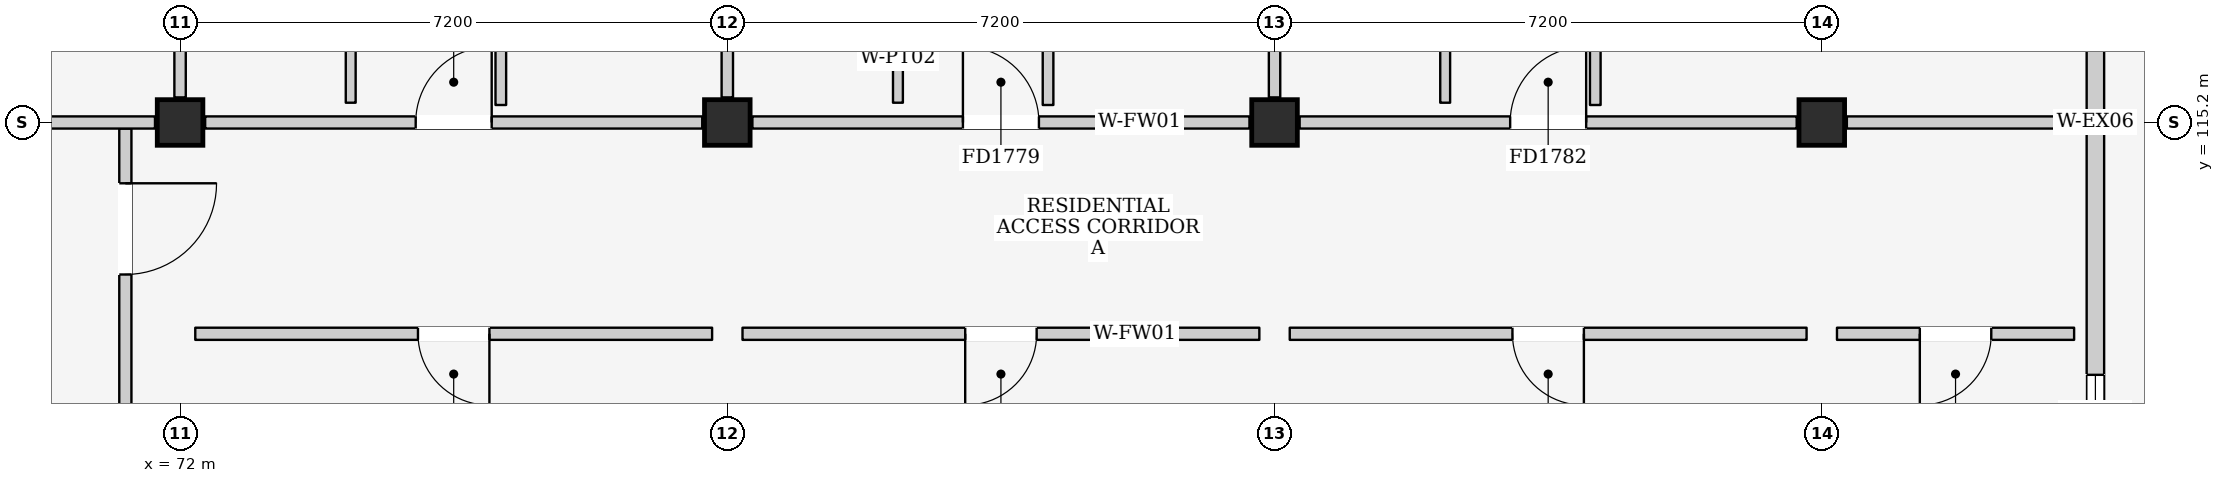
"""IFC4 building model, lengths in metres.
Left out: names, types, materials, properties, quantities, classifications, styles, units other than length and angle.
Written with IfcOpenShell. Run it as: python <this file> out.ifc"""

import sys

from ifc_helpers import new_model, si_unit, direction, frame, frame_2d, origin, origin_2d, place, context, subcontext, project, spatial, rectangle, extrude, element, fill, save


model = new_model("IFC4")
c1 = context("Model", 3, precision=1e-05, world=origin(), true_north=direction((0.0, 1.0)))
c2 = subcontext(c1, "Body", "Model", "MODEL_VIEW")
j1 = project(units=[si_unit("LENGTHUNIT", "METRE"), si_unit("PLANEANGLEUNIT", "RADIAN")], contexts=[c1])
p1 = place(None, origin())
s1 = spatial("IfcSite", under=j1, at=p1, CompositionType="ELEMENT")
p2 = place(p1, origin())
s2 = spatial("IfcBuilding", under=s1, at=p2, CompositionType="ELEMENT")
p3 = place(p2, frame((0.0, 0.0, 31.5)))
s3 = spatial("IfcBuildingStorey", under=s2, at=p3, CompositionType="ELEMENT", Elevation=31.5)
for number, where, z_axis, x_axis in (
    (1, (72.0, 115.2, 0.0), (0.0, 0.0, 1.0), (1.0, 0.0, 0.0)),
    (2, (79.2, 115.2, 0.0), (0.0, 0.0, 1.0), (1.0, 0.0, 0.0)),
    (3, (86.4, 115.2, 0.0), (0.0, 0.0, 1.0), (1.0, 0.0, 0.0)),
    (4, (93.6, 115.2, 0.0), (0.0, 0.0, 1.0), (1.0, 0.0, 0.0)),
):
    element("IfcColumn", number, at=place(p3, frame(where, z_axis=z_axis, x_axis=x_axis)), inside=s3, PredefinedType="COLUMN", context=c2, shape_type="SweptSolid", body=[
        extrude(rectangle(XDim=0.6, YDim=0.6, at=origin_2d()), origin(), (0.0, 0.0, 1.0), 3.3),
    ])
p4 = place(p3, frame((97.2, 108.13, 0.0), z_axis=(0.0, 0.0, 1.0), x_axis=(0.0, 1.0, 0.0)))
e5 = element("IfcWall", 5, at=p4, inside=s3, PredefinedType="ELEMENTEDWALL", context=c2, shape_type="SweptSolid", body=[
    extrude(rectangle(XDim=7.07, YDim=0.23, at=frame_2d((3.535, 0.0))), origin(), (0.0, 0.0, 1.0), 2.515),
])
p5 = place(p4, frame((2.75, 0.0, 1.1)))
e6 = element("IfcOpeningElement", 6, at=p5, cuts=e5, PredefinedType="OPENING", context=c2, shape_type="SweptSolid", body=[
    extrude(rectangle(XDim=1.0, YDim=0.9, at=frame_2d((0.5, 0.45))), frame((0.0, 0.13, 0.0), z_axis=(0.0, -1.0, 0.0), x_axis=(1.0, 0.0, 0.0)), (0.0, 0.0, 1.0), 0.26),
])
p6 = place(p3, frame((97.2, 115.2, 0.0), z_axis=(0.0, 0.0, 1.0), x_axis=(0.0, 1.0, 0.0)))
e7 = element("IfcWall", 7, at=p6, inside=s3, PredefinedType="ELEMENTEDWALL", context=c2, shape_type="SweptSolid", body=[
    extrude(rectangle(XDim=7.07, YDim=0.23, at=frame_2d((3.535, 0.0))), origin(), (0.0, 0.0, 1.0), 2.515),
])
p7 = place(p6, frame((3.6, 0.0, 0.0)))
e8 = element("IfcOpeningElement", 8, at=p7, cuts=e7, PredefinedType="OPENING", context=c2, shape_type="SweptSolid", body=[
    extrude(rectangle(XDim=1.08, YDim=2.12, at=frame_2d((0.54, 1.06))), frame((0.0, 0.13, 0.0), z_axis=(0.0, -1.0, 0.0), x_axis=(1.0, 0.0, 0.0)), (0.0, 0.0, 1.0), 0.26),
])
p8 = place(p3, frame((71.28, 110.8, 0.0), z_axis=(0.0, 0.0, 1.0), x_axis=(0.0, 1.0, 0.0)))
e9 = element("IfcWall", 9, at=p8, inside=s3, PredefinedType="PARTITIONING", context=c2, shape_type="SweptSolid", body=[
    extrude(rectangle(XDim=4.32, YDim=0.16, at=frame_2d((2.16, 0.0))), origin(), (0.0, 0.0, 1.0), 3.08),
])
p9 = place(p8, frame((2.4, 0.0, 0.0)))
e10 = element("IfcOpeningElement", 10, at=p9, cuts=e9, PredefinedType="OPENING", context=c2, shape_type="SweptSolid", body=[
    extrude(rectangle(XDim=1.2, YDim=2.2, at=frame_2d((0.6, 1.1))), frame((0.0, 0.095, 0.0), z_axis=(0.0, -1.0, 0.0), x_axis=(1.0, 0.0, 0.0)), (0.0, 0.0, 1.0), 0.19),
])
p10 = place(p3, frame((65.13, 115.2, 0.0), z_axis=(0.0, 0.0, 1.0), x_axis=(1.0, 0.0, 0.0)))
e11 = element("IfcWall", 11, at=p10, inside=s3, PredefinedType="PARTITIONING", context=c2, shape_type="SweptSolid", body=[
    extrude(rectangle(XDim=6.54, YDim=0.16, at=frame_2d((3.27, 0.0))), origin(), (0.0, 0.0, 1.0), 2.415),
])
p11 = place(p10, frame((2.77, 0.0, 0.0)))
e12 = element("IfcOpeningElement", 12, at=p11, cuts=e11, PredefinedType="OPENING", context=c2, shape_type="SweptSolid", body=[
    extrude(rectangle(XDim=1.0, YDim=2.15, at=frame_2d((0.5, 1.075))), frame((0.0, 0.095, 0.0), z_axis=(0.0, -1.0, 0.0), x_axis=(1.0, 0.0, 0.0)), (0.0, 0.0, 1.0), 0.19),
])
p12 = place(p3, frame((72.0, 115.53, 0.0), z_axis=(0.0, 0.0, 1.0), x_axis=(0.0, 1.0, 0.0)))
e13 = element("IfcWall", 13, at=p12, inside=s3, PredefinedType="PARTITIONING", context=c2, shape_type="SweptSolid", body=[
    extrude(rectangle(XDim=6.54, YDim=0.15, at=frame_2d((3.27, 0.0))), origin(), (0.0, 0.0, 1.0), 2.565),
])
p13 = place(p3, frame((72.33, 115.2, 0.0), z_axis=(0.0, 0.0, 1.0), x_axis=(1.0, 0.0, 0.0)))
e14 = element("IfcWall", 14, at=p13, inside=s3, PredefinedType="PARTITIONING", context=c2, shape_type="SweptSolid", body=[
    extrude(rectangle(XDim=6.54, YDim=0.16, at=frame_2d((3.27, 0.0))), origin(), (0.0, 0.0, 1.0), 2.415),
])
p14 = place(p13, frame((2.77, 0.0, 0.0)))
e15 = element("IfcOpeningElement", 15, at=p14, cuts=e14, PredefinedType="OPENING", context=c2, shape_type="SweptSolid", body=[
    extrude(rectangle(XDim=1.0, YDim=2.15, at=frame_2d((0.5, 1.075))), frame((0.0, 0.095, 0.0), z_axis=(0.0, -1.0, 0.0), x_axis=(1.0, 0.0, 0.0)), (0.0, 0.0, 1.0), 0.19),
])
p15 = place(p3, frame((79.2, 115.53, 0.0), z_axis=(0.0, 0.0, 1.0), x_axis=(0.0, 1.0, 0.0)))
e16 = element("IfcWall", 16, at=p15, inside=s3, PredefinedType="PARTITIONING", context=c2, shape_type="SweptSolid", body=[
    extrude(rectangle(XDim=6.54, YDim=0.15, at=frame_2d((3.27, 0.0))), origin(), (0.0, 0.0, 1.0), 2.565),
])
p16 = place(p3, frame((74.245, 115.46, 0.0), z_axis=(0.0, 0.0, 1.0), x_axis=(0.0, 1.0, 0.0)))
e17 = element("IfcWall", 17, at=p16, inside=s3, PredefinedType="PARTITIONING", context=c2, shape_type="SweptSolid", body=[
    extrude(rectangle(XDim=2.13, YDim=0.13, at=frame_2d((1.065, 0.0))), origin(), (0.0, 0.0, 1.0), 3.08),
])
p17 = place(p3, frame((76.22, 115.43, 0.0), z_axis=(0.0, 0.0, 1.0), x_axis=(0.0, 1.0, 0.0)))
e18 = element("IfcWall", 18, at=p17, inside=s3, PredefinedType="PARTITIONING", context=c2, shape_type="SweptSolid", body=[
    extrude(rectangle(XDim=2.15, YDim=0.14, at=frame_2d((1.075, 0.0))), origin(), (0.0, 0.0, 1.0), 3.08),
])
p18 = place(p3, frame((79.53, 115.2, 0.0), z_axis=(0.0, 0.0, 1.0), x_axis=(1.0, 0.0, 0.0)))
e19 = element("IfcWall", 19, at=p18, inside=s3, PredefinedType="PARTITIONING", context=c2, shape_type="SweptSolid", body=[
    extrude(rectangle(XDim=6.54, YDim=0.16, at=frame_2d((3.27, 0.0))), origin(), (0.0, 0.0, 1.0), 2.415),
])
p19 = place(p18, frame((2.77, 0.0, 0.0)))
e20 = element("IfcOpeningElement", 20, at=p19, cuts=e19, PredefinedType="OPENING", context=c2, shape_type="SweptSolid", body=[
    extrude(rectangle(XDim=1.0, YDim=2.15, at=frame_2d((0.5, 1.075))), frame((0.0, 0.095, 0.0), z_axis=(0.0, -1.0, 0.0), x_axis=(1.0, 0.0, 0.0)), (0.0, 0.0, 1.0), 0.19),
])
p20 = place(p3, frame((86.4, 115.53, 0.0), z_axis=(0.0, 0.0, 1.0), x_axis=(0.0, 1.0, 0.0)))
e21 = element("IfcWall", 21, at=p20, inside=s3, PredefinedType="PARTITIONING", context=c2, shape_type="SweptSolid", body=[
    extrude(rectangle(XDim=6.54, YDim=0.15, at=frame_2d((3.27, 0.0))), origin(), (0.0, 0.0, 1.0), 2.565),
])
p21 = place(p3, frame((81.445, 115.46, 0.0), z_axis=(0.0, 0.0, 1.0), x_axis=(0.0, 1.0, 0.0)))
e22 = element("IfcWall", 22, at=p21, inside=s3, PredefinedType="PARTITIONING", context=c2, shape_type="SweptSolid", body=[
    extrude(rectangle(XDim=2.13, YDim=0.13, at=frame_2d((1.065, 0.0))), origin(), (0.0, 0.0, 1.0), 3.08),
])
p22 = place(p3, frame((83.42, 115.43, 0.0), z_axis=(0.0, 0.0, 1.0), x_axis=(0.0, 1.0, 0.0)))
e23 = element("IfcWall", 23, at=p22, inside=s3, PredefinedType="PARTITIONING", context=c2, shape_type="SweptSolid", body=[
    extrude(rectangle(XDim=2.15, YDim=0.14, at=frame_2d((1.075, 0.0))), origin(), (0.0, 0.0, 1.0), 3.08),
])
p23 = place(p3, frame((86.73, 115.2, 0.0), z_axis=(0.0, 0.0, 1.0), x_axis=(1.0, 0.0, 0.0)))
e24 = element("IfcWall", 24, at=p23, inside=s3, PredefinedType="PARTITIONING", context=c2, shape_type="SweptSolid", body=[
    extrude(rectangle(XDim=6.54, YDim=0.16, at=frame_2d((3.27, 0.0))), origin(), (0.0, 0.0, 1.0), 2.415),
])
p24 = place(p23, frame((2.77, 0.0, 0.0)))
e25 = element("IfcOpeningElement", 25, at=p24, cuts=e24, PredefinedType="OPENING", context=c2, shape_type="SweptSolid", body=[
    extrude(rectangle(XDim=1.0, YDim=2.15, at=frame_2d((0.5, 1.075))), frame((0.0, 0.095, 0.0), z_axis=(0.0, -1.0, 0.0), x_axis=(1.0, 0.0, 0.0)), (0.0, 0.0, 1.0), 0.19),
])
p25 = place(p3, frame((93.93, 115.2, 0.0), z_axis=(0.0, 0.0, 1.0), x_axis=(1.0, 0.0, 0.0)))
e26 = element("IfcWall", 26, at=p25, inside=s3, PredefinedType="PARTITIONING", context=c2, shape_type="SweptSolid", body=[
    extrude(rectangle(XDim=2.99, YDim=0.16, at=frame_2d((1.495, 0.0))), origin(), (0.0, 0.0, 1.0), 2.415),
])
p26 = place(p3, frame((88.645, 115.46, 0.0), z_axis=(0.0, 0.0, 1.0), x_axis=(0.0, 1.0, 0.0)))
e27 = element("IfcWall", 27, at=p26, inside=s3, PredefinedType="PARTITIONING", context=c2, shape_type="SweptSolid", body=[
    extrude(rectangle(XDim=2.13, YDim=0.13, at=frame_2d((1.065, 0.0))), origin(), (0.0, 0.0, 1.0), 3.08),
])
p27 = place(p3, frame((90.62, 115.43, 0.0), z_axis=(0.0, 0.0, 1.0), x_axis=(0.0, 1.0, 0.0)))
e28 = element("IfcWall", 28, at=p27, inside=s3, PredefinedType="PARTITIONING", context=c2, shape_type="SweptSolid", body=[
    extrude(rectangle(XDim=2.15, YDim=0.14, at=frame_2d((1.075, 0.0))), origin(), (0.0, 0.0, 1.0), 3.08),
])
p28 = place(p3, frame((72.2, 112.42, 0.0), z_axis=(0.0, 0.0, 1.0), x_axis=(1.0, 0.0, 0.0)))
e29 = element("IfcWall", 29, at=p28, inside=s3, PredefinedType="PARTITIONING", context=c2, shape_type="SweptSolid", body=[
    extrude(rectangle(XDim=6.8, YDim=0.16, at=frame_2d((3.4, 0.0))), origin(), (0.0, 0.0, 1.0), 3.08),
])
p29 = place(p28, frame((2.93, 0.0, 0.0)))
e30 = element("IfcOpeningElement", 30, at=p29, cuts=e29, PredefinedType="OPENING", context=c2, shape_type="SweptSolid", body=[
    extrude(rectangle(XDim=0.94, YDim=2.12, at=frame_2d((0.47, 1.06))), frame((0.0, 0.095, 0.0), z_axis=(0.0, -1.0, 0.0), x_axis=(1.0, 0.0, 0.0)), (0.0, 0.0, 1.0), 0.19),
])
p30 = place(p3, frame((79.4, 112.42, 0.0), z_axis=(0.0, 0.0, 1.0), x_axis=(1.0, 0.0, 0.0)))
e31 = element("IfcWall", 31, at=p30, inside=s3, PredefinedType="PARTITIONING", context=c2, shape_type="SweptSolid", body=[
    extrude(rectangle(XDim=6.8, YDim=0.16, at=frame_2d((3.4, 0.0))), origin(), (0.0, 0.0, 1.0), 3.08),
])
p31 = place(p30, frame((2.93, 0.0, 0.0)))
e32 = element("IfcOpeningElement", 32, at=p31, cuts=e31, PredefinedType="OPENING", context=c2, shape_type="SweptSolid", body=[
    extrude(rectangle(XDim=0.94, YDim=2.12, at=frame_2d((0.47, 1.06))), frame((0.0, 0.095, 0.0), z_axis=(0.0, -1.0, 0.0), x_axis=(1.0, 0.0, 0.0)), (0.0, 0.0, 1.0), 0.19),
])
p32 = place(p3, frame((86.6, 112.42, 0.0), z_axis=(0.0, 0.0, 1.0), x_axis=(1.0, 0.0, 0.0)))
e33 = element("IfcWall", 33, at=p32, inside=s3, PredefinedType="PARTITIONING", context=c2, shape_type="SweptSolid", body=[
    extrude(rectangle(XDim=6.8, YDim=0.16, at=frame_2d((3.4, 0.0))), origin(), (0.0, 0.0, 1.0), 3.08),
])
p33 = place(p32, frame((2.93, 0.0, 0.0)))
e34 = element("IfcOpeningElement", 34, at=p33, cuts=e33, PredefinedType="OPENING", context=c2, shape_type="SweptSolid", body=[
    extrude(rectangle(XDim=0.94, YDim=2.12, at=frame_2d((0.47, 1.06))), frame((0.0, 0.095, 0.0), z_axis=(0.0, -1.0, 0.0), x_axis=(1.0, 0.0, 0.0)), (0.0, 0.0, 1.0), 0.19),
])
p34 = place(p3, frame((93.8, 112.42, 0.0), z_axis=(0.0, 0.0, 1.0), x_axis=(1.0, 0.0, 0.0)))
e35 = element("IfcWall", 35, at=p34, inside=s3, PredefinedType="PARTITIONING", context=c2, shape_type="SweptSolid", body=[
    extrude(rectangle(XDim=3.12, YDim=0.16, at=frame_2d((1.56, 0.0))), origin(), (0.0, 0.0, 1.0), 3.08),
])
p35 = place(p34, frame((1.09, 0.0, 0.0)))
e36 = element("IfcOpeningElement", 36, at=p35, cuts=e35, PredefinedType="OPENING", context=c2, shape_type="SweptSolid", body=[
    extrude(rectangle(XDim=0.94, YDim=2.12, at=frame_2d((0.47, 1.06))), frame((0.0, 0.095, 0.0), z_axis=(0.0, -1.0, 0.0), x_axis=(1.0, 0.0, 0.0)), (0.0, 0.0, 1.0), 0.19),
])
p36 = place(p5, origin())
e37 = element("IfcWindow", 37, at=p36, inside=s3, PartitioningType="SINGLE_PANEL", PredefinedType="WINDOW", context=c2, shape_type="SweptSolid", body=[
    extrude(rectangle(XDim=1.0, YDim=0.9, at=frame_2d((0.5, 0.45))), frame((0.0, 0.03, 0.0), z_axis=(0.0, -1.0, 0.0), x_axis=(1.0, 0.0, 0.0)), (0.0, 0.0, 1.0), 0.06),
])
fill(e6, e37)
p37 = place(p9, frame((1.2, 0.0, 0.0), z_axis=(0.0, 0.0, 1.0), x_axis=(-1.0, 0.0, 0.0)))
e38 = element("IfcDoor", 38, at=p37, inside=s3, OperationType="SINGLE_SWING_LEFT", PredefinedType="DOOR", context=c2, shape_type="SweptSolid", body=[
    extrude(rectangle(XDim=1.2, YDim=2.2, at=frame_2d((0.6, 1.1))), frame((0.0, 0.025, 0.0), z_axis=(0.0, -1.0, 0.0), x_axis=(1.0, 0.0, 0.0)), (0.0, 0.0, 1.0), 0.05),
])
fill(e10, e38)
p38 = place(p14, origin())
e39 = element("IfcDoor", 39, at=p38, inside=s3, OperationType="SINGLE_SWING_RIGHT", PredefinedType="DOOR", context=c2, shape_type="SweptSolid", body=[
    extrude(rectangle(XDim=1.0, YDim=2.15, at=frame_2d((0.5, 1.075))), frame((0.0, 0.025, 0.0), z_axis=(0.0, -1.0, 0.0), x_axis=(1.0, 0.0, 0.0)), (0.0, 0.0, 1.0), 0.05),
])
fill(e15, e39)
p39 = place(p19, origin())
e40 = element("IfcDoor", 40, at=p39, inside=s3, OperationType="SINGLE_SWING_LEFT", PredefinedType="DOOR", context=c2, shape_type="SweptSolid", body=[
    extrude(rectangle(XDim=1.0, YDim=2.15, at=frame_2d((0.5, 1.075))), frame((0.0, 0.025, 0.0), z_axis=(0.0, -1.0, 0.0), x_axis=(1.0, 0.0, 0.0)), (0.0, 0.0, 1.0), 0.05),
])
fill(e20, e40)
p40 = place(p24, origin())
e41 = element("IfcDoor", 41, at=p40, inside=s3, OperationType="SINGLE_SWING_RIGHT", PredefinedType="DOOR", context=c2, shape_type="SweptSolid", body=[
    extrude(rectangle(XDim=1.0, YDim=2.15, at=frame_2d((0.5, 1.075))), frame((0.0, 0.025, 0.0), z_axis=(0.0, -1.0, 0.0), x_axis=(1.0, 0.0, 0.0)), (0.0, 0.0, 1.0), 0.05),
])
fill(e25, e41)
p41 = place(p29, frame((0.94, 0.0, 0.0), z_axis=(0.0, 0.0, 1.0), x_axis=(-1.0, 0.0, 0.0)))
e42 = element("IfcDoor", 42, at=p41, inside=s3, OperationType="SINGLE_SWING_LEFT", PredefinedType="DOOR", context=c2, shape_type="SweptSolid", body=[
    extrude(rectangle(XDim=0.94, YDim=2.12, at=frame_2d((0.47, 1.06))), frame((0.0, 0.025, 0.0), z_axis=(0.0, -1.0, 0.0), x_axis=(1.0, 0.0, 0.0)), (0.0, 0.0, 1.0), 0.05),
])
fill(e30, e42)
p42 = place(p31, frame((0.94, 0.0, 0.0), z_axis=(0.0, 0.0, 1.0), x_axis=(-1.0, 0.0, 0.0)))
e43 = element("IfcDoor", 43, at=p42, inside=s3, OperationType="SINGLE_SWING_RIGHT", PredefinedType="DOOR", context=c2, shape_type="SweptSolid", body=[
    extrude(rectangle(XDim=0.94, YDim=2.12, at=frame_2d((0.47, 1.06))), frame((0.0, 0.025, 0.0), z_axis=(0.0, -1.0, 0.0), x_axis=(1.0, 0.0, 0.0)), (0.0, 0.0, 1.0), 0.05),
])
fill(e32, e43)
p43 = place(p33, frame((0.94, 0.0, 0.0), z_axis=(0.0, 0.0, 1.0), x_axis=(-1.0, 0.0, 0.0)))
e44 = element("IfcDoor", 44, at=p43, inside=s3, OperationType="SINGLE_SWING_LEFT", PredefinedType="DOOR", context=c2, shape_type="SweptSolid", body=[
    extrude(rectangle(XDim=0.94, YDim=2.12, at=frame_2d((0.47, 1.06))), frame((0.0, 0.025, 0.0), z_axis=(0.0, -1.0, 0.0), x_axis=(1.0, 0.0, 0.0)), (0.0, 0.0, 1.0), 0.05),
])
fill(e34, e44)
p44 = place(p35, frame((0.94, 0.0, 0.0), z_axis=(0.0, 0.0, 1.0), x_axis=(-1.0, 0.0, 0.0)))
e45 = element("IfcDoor", 45, at=p44, inside=s3, OperationType="SINGLE_SWING_RIGHT", PredefinedType="DOOR", context=c2, shape_type="SweptSolid", body=[
    extrude(rectangle(XDim=0.94, YDim=2.12, at=frame_2d((0.47, 1.06))), frame((0.0, 0.025, 0.0), z_axis=(0.0, -1.0, 0.0), x_axis=(1.0, 0.0, 0.0)), (0.0, 0.0, 1.0), 0.05),
])
fill(e36, e45)
save(model, sys.argv[1])
